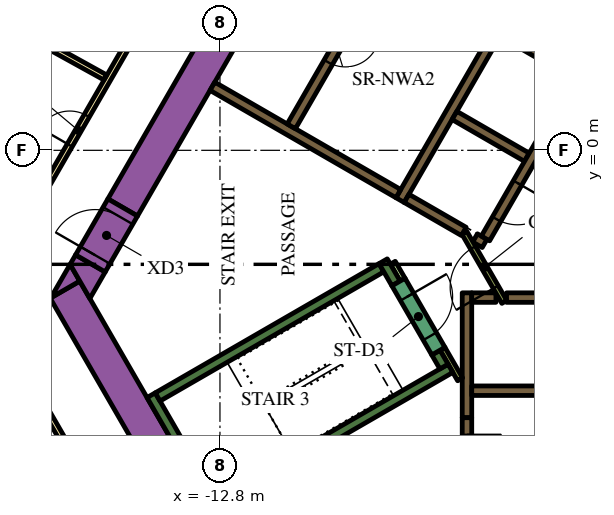
"""IFC4 building model, lengths in metres.
Left out: names, types, materials, properties, quantities, classifications, styles, units other than length and angle.
Written with IfcOpenShell. Run it as: python <this file> out.ifc"""

import sys

from ifc_helpers import new_model, si_unit, direction, frame, frame_2d, origin, place, context, subcontext, project, spatial, polyline, rectangle, outline, extrude, element, fill, save


model = new_model("IFC4")
c1 = context("Model", 3, precision=1e-05, world=origin(), true_north=direction((0.0, 1.0)))
c2 = subcontext(c1, "Body", "Model", "MODEL_VIEW")
j1 = project(units=[si_unit("LENGTHUNIT", "METRE"), si_unit("PLANEANGLEUNIT", "RADIAN")], contexts=[c1])
p1 = place(None, origin())
s1 = spatial("IfcSite", under=j1, at=p1, CompositionType="ELEMENT")
p2 = place(p1, origin())
s2 = spatial("IfcBuilding", under=s1, at=p2, CompositionType="ELEMENT")
p3 = place(p2, frame((0.0, 0.0, 70.5)))
s3 = spatial("IfcBuildingStorey", under=s2, at=p3, CompositionType="ELEMENT", Elevation=70.5)
p4 = place(p3, frame((-15.36, -1.503, 0.0), z_axis=(0.0, 0.0, 1.0), x_axis=(0.50000389221, 0.866023156604, 0.0)))
e1 = element("IfcWall", 1, at=p4, inside=s3, PredefinedType="SOLIDWALL", context=c2, shape_type="SweptSolid", body=[
    extrude(rectangle(XDim=21.0, YDim=0.9, at=frame_2d((10.5, 0.0))), origin(), (0.0, 0.0, 1.0), 3.9),
])
p5 = place(p3, frame((-12.134, -11.883, 0.0), z_axis=(0.0, 0.0, 1.0), x_axis=(-0.500005339912, 0.866022320763, 0.0)))
e2 = element("IfcWall", 2, at=p5, inside=s3, PredefinedType="SOLIDWALL", context=c2, shape_type="SweptSolid", body=[
    extrude(rectangle(XDim=9.488, YDim=0.9, at=frame_2d((4.744, 0.0))), origin(), (0.0, 0.0, 1.0), 3.9),
])
p6 = place(p3, origin())
e3 = element("IfcWall", 3, at=p6, inside=s3, PredefinedType="SOLIDWALL", context=c2, shape_type="SweptSolid", body=[
    extrude(outline(polyline([(-16.489, -3.44), (-17.251, -3.88), (-16.743, -3.0), (-16.489, -3.44)])), origin(), (0.0, 0.0, 1.0), 3.9),
])
e4 = element("IfcWall", 4, at=p6, inside=s3, PredefinedType="SOLIDWALL", context=c2, shape_type="SweptSolid", body=[
    extrude(outline(polyline([(-15.82, -3.201), (-16.223, -3.9), (-16.743, -3.0), (-16.599, -2.751), (-15.82, -3.201)])), origin(), (0.0, 0.0, 1.0), 3.9),
])
p7 = place(p3, frame((-12.885, -9.431, 0.0), z_axis=(0.0, 0.0, 1.0), x_axis=(-0.500020560727, 0.866013532718, 0.0)))
e5 = element("IfcWall", 5, at=p7, inside=s3, PredefinedType="SOLIDWALL", context=c2, shape_type="SweptSolid", body=[
    extrude(rectangle(XDim=3.45, YDim=0.25, at=frame_2d((1.725, 0.0))), origin(), (0.0, 0.0, 1.0), 3.9),
])
p8 = place(p3, frame((-14.44, -6.49, 0.0), z_axis=(0.0, 0.0, 1.0), x_axis=(0.866022966069, 0.500004222222, 0.0)))
e6 = element("IfcWall", 6, at=p8, inside=s3, PredefinedType="SOLIDWALL", context=c2, shape_type="SweptSolid", body=[
    extrude(rectangle(XDim=6.8, YDim=0.25, at=frame_2d((3.4, 0.0))), origin(), (0.0, 0.0, 1.0), 3.9),
])
p9 = place(p3, frame((-8.168, -3.503, 0.0), z_axis=(0.0, 0.0, 1.0), x_axis=(-0.499952099219, 0.866053057547, 0.0)))
e7 = element("IfcWall", 7, at=p9, inside=s3, PredefinedType="SOLIDWALL", context=c2, shape_type="SweptSolid", body=[
    extrude(rectangle(XDim=0.675, YDim=0.25, at=frame_2d((0.337, 0.0))), origin(), (0.0, 0.0, 1.0), 3.9),
])
p10 = place(p3, frame((-12.84, -9.261, 0.0), z_axis=(0.0, 0.0, 1.0), x_axis=(0.866016039709, 0.500016218704, 0.0)))
e8 = element("IfcWall", 8, at=p10, inside=s3, PredefinedType="SOLIDWALL", context=c2, shape_type="SweptSolid", body=[
    extrude(rectangle(XDim=7.05, YDim=0.25, at=frame_2d((3.525, 0.0))), origin(), (0.0, 0.0, 1.0), 3.9),
])
p11 = place(p3, frame((-6.905, -5.69, 0.0), z_axis=(0.0, 0.0, 1.0), x_axis=(-0.500402024738, 0.865793170242, 0.0)))
e9 = element("IfcWall", 9, at=p11, inside=s3, PredefinedType="SOLIDWALL", context=c2, shape_type="SweptSolid", body=[
    extrude(rectangle(XDim=0.425, YDim=0.25, at=frame_2d((0.212, 0.0))), origin(), (0.0, 0.0, 1.0), 3.9),
])
p12 = place(p3, frame((-5.259, -3.875, 0.0), z_axis=(0.0, 0.0, 1.0), x_axis=(1.0, 0.0, 0.0)))
e10 = element("IfcWall", 10, at=p12, inside=s3, PredefinedType="SOLIDWALL", context=c2, shape_type="SweptSolid", body=[
    extrude(rectangle(XDim=10.489, YDim=0.25, at=frame_2d((5.244, 0.0))), origin(), (0.0, 0.0, 1.0), 3.9),
])
p13 = place(p3, frame((-6.3, -7.035, 0.0), z_axis=(0.0, 0.0, 1.0), x_axis=(0.0, 1.0, 0.0)))
e11 = element("IfcWall", 11, at=p13, inside=s3, PredefinedType="SOLIDWALL", context=c2, shape_type="SweptSolid", body=[
    extrude(rectangle(XDim=3.285, YDim=0.25, at=frame_2d((1.643, 0.0))), origin(), (0.0, 0.0, 1.0), 3.9),
])
p14 = place(p3, frame((-6.175, -3.875, 0.0), z_axis=(0.0, 0.0, 1.0), x_axis=(1.0, 0.0, 0.0)))
e12 = element("IfcWall", 12, at=p14, inside=s3, PredefinedType="SOLIDWALL", context=c2, shape_type="SweptSolid", body=[
    extrude(rectangle(XDim=0.637, YDim=0.25, at=frame_2d((0.318, 0.0))), origin(), (0.0, 0.0, 1.0), 3.9),
])
p15 = place(p3, frame((-8.06, -1.311, 0.0), z_axis=(0.0, 0.0, 1.0), x_axis=(0.50000273126, 0.866023826885, 0.0)))
e13 = element("IfcWall", 13, at=p15, inside=s3, PredefinedType="SOLIDWALL", context=c2, shape_type="SweptSolid", body=[
    extrude(rectangle(XDim=10.33, YDim=0.25, at=frame_2d((5.165, 0.0))), origin(), (0.0, 0.0, 1.0), 3.9),
])
for number, where, z_axis, x_axis in (
    (14, (-5.369, 3.1, 0.0), (0.0, 0.0, 1.0), (0.866, -0.5, 0.0)),
    (15, (-4.724, -0.182, 0.0), (0.0, 0.0, 1.0), (-0.866, 0.5, 0.0)),
):
    element("IfcWall", number, at=place(p3, frame(where, z_axis=z_axis, x_axis=x_axis)), inside=s3, PredefinedType="SOLIDWALL", context=c2, shape_type="SweptSolid", body=[
        extrude(rectangle(XDim=2.2, YDim=0.25, at=frame_2d((1.1, 0.0))), origin(), (0.0, 0.0, 1.0), 3.9),
    ])
p16 = place(p3, frame((-6.088, -2.305, 0.0), z_axis=(0.0, 0.0, 1.0), x_axis=(0.866059450854, -0.499941024108, 0.0)))
e16 = element("IfcWall", 16, at=p16, inside=s3, PredefinedType="SOLIDWALL", context=c2, shape_type="SweptSolid", body=[
    extrude(rectangle(XDim=0.29, YDim=0.25, at=frame_2d((0.145, 0.0))), origin(), (0.0, 0.0, 1.0), 3.9),
])
p17 = place(p3, frame((-7.889, -1.265, 0.0), z_axis=(0.0, 0.0, 1.0), x_axis=(0.865986741702, -0.500066958712, 0.0)))
e17 = element("IfcWall", 17, at=p17, inside=s3, PredefinedType="SOLIDWALL", context=c2, shape_type="SweptSolid", body=[
    extrude(rectangle(XDim=1.738, YDim=0.25, at=frame_2d((0.869, 0.0))), origin(), (0.0, 0.0, 1.0), 3.9),
])
p18 = place(p3, frame((-8.106, -1.14, 0.0), z_axis=(0.0, 0.0, 1.0), x_axis=(-0.866000643155, 0.500042884217, 0.0)))
e18 = element("IfcWall", 18, at=p18, inside=s3, PredefinedType="SOLIDWALL", context=c2, shape_type="SweptSolid", body=[
    extrude(rectangle(XDim=5.65, YDim=0.25, at=frame_2d((2.825, 0.0))), origin(), (0.0, 0.0, 1.0), 3.9),
])
p19 = place(p3, frame((-6.48, -6.027, 0.0), z_axis=(0.0, 0.0, 1.0), x_axis=(-0.499927229454, 0.866067413802, 0.0)))
e19 = element("IfcWall", 19, at=p19, inside=s3, PredefinedType="PARTITIONING", context=c2, shape_type="SweptSolid", body=[
    extrude(rectangle(XDim=0.929, YDim=0.15, at=frame_2d((0.464, 0.0))), origin(), (0.0, 0.0, 1.0), 3.9),
])
p20 = place(p3, frame((-8.252, -2.958, 0.0), z_axis=(0.0, 0.0, 1.0), x_axis=(0.500174715838, -0.865924508047, 0.0)))
e20 = element("IfcWall", 20, at=p20, inside=s3, PredefinedType="PARTITIONING", context=c2, shape_type="SweptSolid", body=[
    extrude(rectangle(XDim=0.514, YDim=0.15, at=frame_2d((0.257, 0.0))), origin(), (0.0, 0.0, 1.0), 2.75),
])
p21 = place(p3, frame((-6.175, -6.325, 0.0), z_axis=(0.0, 0.0, 1.0), x_axis=(1.0, 0.0, 0.0)))
e21 = element("IfcWall", 21, at=p21, inside=s3, PredefinedType="SOLIDWALL", context=c2, shape_type="SweptSolid", body=[
    extrude(rectangle(XDim=12.35, YDim=0.25, at=frame_2d((6.175, 0.0))), origin(), (0.0, 0.0, 1.0), 3.9),
])
p22 = place(p21, frame((3.205, 0.0, 0.0)))
e22 = element("IfcOpeningElement", 22, at=p22, cuts=e21, PredefinedType="OPENING", context=c2, shape_type="SweptSolid", body=[
    extrude(rectangle(XDim=0.9, YDim=2.1, at=frame_2d((0.45, 1.05))), frame((0.0, 0.135, 0.0), z_axis=(0.0, -1.0, 0.0), x_axis=(1.0, 0.0, 0.0)), (0.0, 0.0, 1.0), 0.27),
])
p23 = place(p21, frame((8.145, 0.0, 0.0)))
e23 = element("IfcOpeningElement", 23, at=p23, cuts=e21, PredefinedType="OPENING", context=c2, shape_type="SweptSolid", body=[
    extrude(rectangle(XDim=1.1, YDim=2.1, at=frame_2d((0.55, 1.05))), frame((0.0, 0.135, 0.0), z_axis=(0.0, -1.0, 0.0), x_axis=(1.0, 0.0, 0.0)), (0.0, 0.0, 1.0), 0.27),
])
p24 = place(p21, frame((10.665, 0.0, 0.0)))
e24 = element("IfcOpeningElement", 24, at=p24, cuts=e21, PredefinedType="OPENING", context=c2, shape_type="SweptSolid", body=[
    extrude(rectangle(XDim=1.1, YDim=2.1, at=frame_2d((0.55, 1.05))), frame((0.0, 0.135, 0.0), z_axis=(0.0, -1.0, 0.0), x_axis=(1.0, 0.0, 0.0)), (0.0, 0.0, 1.0), 0.27),
])
p25 = place(p3, frame((-6.008, 9.144, 0.0), z_axis=(0.0, 0.0, 1.0), x_axis=(-0.500006956611, -0.866021387346, 0.0)))
e25 = element("IfcWall", 25, at=p25, inside=s3, PredefinedType="SOLIDWALL", context=c2, shape_type="SweptSolid", body=[
    extrude(rectangle(XDim=9.83, YDim=0.25, at=frame_2d((4.915, 0.0))), origin(), (0.0, 0.0, 1.0), 3.9),
])
p26 = place(p25, frame((6.985, 0.0, 0.0)))
e26 = element("IfcOpeningElement", 26, at=p26, cuts=e25, PredefinedType="OPENING", context=c2, shape_type="SweptSolid", body=[
    extrude(rectangle(XDim=0.9, YDim=2.1, at=frame_2d((0.45, 1.05))), frame((0.0, 0.135, 0.0), z_axis=(0.0, -1.0, 0.0), x_axis=(1.0, 0.0, 0.0)), (0.0, 0.0, 1.0), 0.27),
])
p27 = place(p3, frame((-0.898, 6.194, 0.0), z_axis=(0.0, 0.0, 1.0), x_axis=(-0.499996202215, -0.866027596426, 0.0)))
e27 = element("IfcWall", 27, at=p27, inside=s3, PredefinedType="SOLIDWALL", context=c2, shape_type="SweptSolid", body=[
    extrude(rectangle(XDim=9.83, YDim=0.25, at=frame_2d((4.915, 0.0))), origin(), (0.0, 0.0, 1.0), 3.9),
])
p28 = place(p27, frame((0.585, 0.0, 0.0)))
e28 = element("IfcOpeningElement", 28, at=p28, cuts=e27, PredefinedType="OPENING", context=c2, shape_type="SweptSolid", body=[
    extrude(rectangle(XDim=1.1, YDim=2.1, at=frame_2d((0.55, 1.05))), frame((0.0, 0.135, 0.0), z_axis=(0.0, -1.0, 0.0), x_axis=(1.0, 0.0, 0.0)), (0.0, 0.0, 1.0), 0.27),
])
p29 = place(p27, frame((3.105, 0.0, 0.0)))
e29 = element("IfcOpeningElement", 29, at=p29, cuts=e27, PredefinedType="OPENING", context=c2, shape_type="SweptSolid", body=[
    extrude(rectangle(XDim=1.1, YDim=2.1, at=frame_2d((0.55, 1.05))), frame((0.0, 0.135, 0.0), z_axis=(0.0, -1.0, 0.0), x_axis=(1.0, 0.0, 0.0)), (0.0, 0.0, 1.0), 0.27),
])
p30 = place(p27, frame((5.625, 0.0, 0.0)))
e30 = element("IfcOpeningElement", 30, at=p30, cuts=e27, PredefinedType="OPENING", context=c2, shape_type="SweptSolid", body=[
    extrude(rectangle(XDim=1.1, YDim=2.1, at=frame_2d((0.55, 1.05))), frame((0.0, 0.135, 0.0), z_axis=(0.0, -1.0, 0.0), x_axis=(1.0, 0.0, 0.0)), (0.0, 0.0, 1.0), 0.27),
])
p31 = place(p27, frame((8.145, 0.0, 0.0)))
e31 = element("IfcOpeningElement", 31, at=p31, cuts=e27, PredefinedType="OPENING", context=c2, shape_type="SweptSolid", body=[
    extrude(rectangle(XDim=1.1, YDim=2.1, at=frame_2d((0.55, 1.05))), frame((0.0, 0.135, 0.0), z_axis=(0.0, -1.0, 0.0), x_axis=(1.0, 0.0, 0.0)), (0.0, 0.0, 1.0), 0.27),
])
p32 = place(p3, frame((-8.103, -3.466, 0.0), z_axis=(0.0, 0.0, 1.0), x_axis=(0.500078061341, -0.865980330357, 0.0)))
e32 = element("IfcWall", 32, at=p32, inside=s3, PredefinedType="SOLIDWALL", context=c2, shape_type="SweptSolid", body=[
    extrude(rectangle(XDim=2.1, YDim=0.4, at=frame_2d((1.05, 0.0))), origin(), (0.0, 0.0, 1.0), 3.9),
])
p33 = place(p32, frame((0.45, 0.0, 0.0)))
e33 = element("IfcOpeningElement", 33, at=p33, cuts=e32, PredefinedType="OPENING", context=c2, shape_type="SweptSolid", body=[
    extrude(rectangle(XDim=1.2, YDim=2.1, at=frame_2d((0.6, 1.05))), frame((0.0, 0.21, 0.0), z_axis=(0.0, -1.0, 0.0), x_axis=(1.0, 0.0, 0.0)), (0.0, 0.0, 1.0), 0.42),
])
p34 = place(p3, frame((-6.3, -7.035, 0.0), z_axis=(0.0, 0.0, 1.0), x_axis=(0.0, -1.0, 0.0)))
e34 = element("IfcWall", 34, at=p34, inside=s3, PredefinedType="SOLIDWALL", context=c2, shape_type="SweptSolid", body=[
    extrude(rectangle(XDim=1.8, YDim=0.25, at=frame_2d((0.9, 0.0))), origin(), (0.0, 0.0, 1.0), 3.9),
])
p35 = place(p34, frame((0.45, 0.0, 0.0)))
e35 = element("IfcOpeningElement", 35, at=p35, cuts=e34, PredefinedType="OPENING", context=c2, shape_type="SweptSolid", body=[
    extrude(rectangle(XDim=0.9, YDim=2.1, at=frame_2d((0.45, 1.05))), frame((0.0, 0.135, 0.0), z_axis=(0.0, -1.0, 0.0), x_axis=(1.0, 0.0, 0.0)), (0.0, 0.0, 1.0), 0.27),
])
p36 = place(p3, frame((-5.317, -3.99, 0.0), z_axis=(0.0, 0.0, 1.0), x_axis=(-0.500027713859, 0.866009402589, 0.0)))
e36 = element("IfcWall", 36, at=p36, inside=s3, PredefinedType="PARTITIONING", context=c2, shape_type="SweptSolid", body=[
    extrude(rectangle(XDim=2.1, YDim=0.15, at=frame_2d((1.05, 0.0))), origin(), (0.0, 0.0, 1.0), 3.9),
])
p37 = place(p36, frame((0.45, 0.0, 0.0)))
e37 = element("IfcOpeningElement", 37, at=p37, cuts=e36, PredefinedType="OPENING", context=c2, shape_type="SweptSolid", body=[
    extrude(rectangle(XDim=1.2, YDim=2.1, at=frame_2d((0.6, 1.05))), frame((0.0, 0.085, 0.0), z_axis=(0.0, -1.0, 0.0), x_axis=(1.0, 0.0, 0.0)), (0.0, 0.0, 1.0), 0.17),
])
p38 = place(p3, frame((-16.209, -2.976, 0.0), z_axis=(0.0, 0.0, 1.0), x_axis=(0.499954529098, 0.86605165483, 0.0)))
e38 = element("IfcWall", 38, at=p38, inside=s3, PredefinedType="SOLIDWALL", context=c2, shape_type="SweptSolid", body=[
    extrude(rectangle(XDim=1.7, YDim=0.9, at=frame_2d((0.85, 0.0))), origin(), (0.0, 0.0, 1.0), 3.9),
])
p39 = place(p38, frame((0.25, 0.0, 0.0)))
e39 = element("IfcOpeningElement", 39, at=p39, cuts=e38, PredefinedType="OPENING", context=c2, shape_type="SweptSolid", body=[
    extrude(rectangle(XDim=1.2, YDim=2.1, at=frame_2d((0.6, 1.05))), frame((0.0, 0.46, 0.0), z_axis=(0.0, -1.0, 0.0), x_axis=(1.0, 0.0, 0.0)), (0.0, 0.0, 1.0), 0.92),
])
p40 = place(p3, frame((-19.081, -3.9, 0.0), z_axis=(0.0, 0.0, 1.0), x_axis=(0.499998313975, 0.866026377209, 0.0)))
e40 = element("IfcWall", 40, at=p40, inside=s3, PredefinedType="PARTITIONING", context=c2, shape_type="SweptSolid", body=[
    extrude(rectangle(XDim=25.766, YDim=0.15, at=frame_2d((12.883, 0.0))), origin(), (0.0, 0.0, 1.0), 2.75),
])
p41 = place(p40, frame((24.586, 0.0, 0.0)))
e41 = element("IfcOpeningElement", 41, at=p41, cuts=e40, PredefinedType="OPENING", context=c2, shape_type="SweptSolid", body=[
    extrude(rectangle(XDim=1.0, YDim=2.1, at=frame_2d((0.5, 1.05))), frame((0.0, 0.085, 0.0), z_axis=(0.0, -1.0, 0.0), x_axis=(1.0, 0.0, 0.0)), (0.0, 0.0, 1.0), 0.17),
])
p42 = place(p40, frame((9.948, 0.0, 0.0)))
e42 = element("IfcOpeningElement", 42, at=p42, cuts=e40, PredefinedType="OPENING", context=c2, shape_type="SweptSolid", body=[
    extrude(rectangle(XDim=1.0, YDim=2.1, at=frame_2d((0.5, 1.05))), frame((0.0, 0.085, 0.0), z_axis=(0.0, -1.0, 0.0), x_axis=(1.0, 0.0, 0.0)), (0.0, 0.0, 1.0), 0.17),
])
p43 = place(p40, frame((7.782, 0.0, 0.0)))
e43 = element("IfcOpeningElement", 43, at=p43, cuts=e40, PredefinedType="OPENING", context=c2, shape_type="SweptSolid", body=[
    extrude(rectangle(XDim=0.9, YDim=2.1, at=frame_2d((0.45, 1.05))), frame((0.0, 0.085, 0.0), z_axis=(0.0, -1.0, 0.0), x_axis=(1.0, 0.0, 0.0)), (0.0, 0.0, 1.0), 0.17),
])
p44 = place(p40, frame((4.658, 0.0, 0.0)))
e44 = element("IfcOpeningElement", 44, at=p44, cuts=e40, PredefinedType="OPENING", context=c2, shape_type="SweptSolid", body=[
    extrude(rectangle(XDim=0.9, YDim=2.1, at=frame_2d((0.45, 1.05))), frame((0.0, 0.085, 0.0), z_axis=(0.0, -1.0, 0.0), x_axis=(1.0, 0.0, 0.0)), (0.0, 0.0, 1.0), 0.17),
])
p45 = place(p3, frame((-16.412, -8.523, 0.0), z_axis=(0.0, 0.0, 1.0), x_axis=(-0.500001929737, 0.866024289647, 0.0)))
e45 = element("IfcWall", 45, at=p45, inside=s3, PredefinedType="PARTITIONING", context=c2, shape_type="SweptSolid", body=[
    extrude(rectangle(XDim=5.268, YDim=0.15, at=frame_2d((2.634, 0.0))), origin(), (0.0, 0.0, 1.0), 2.75),
])
p46 = place(p45, frame((4.088, 0.0, 0.0)))
e46 = element("IfcOpeningElement", 46, at=p46, cuts=e45, PredefinedType="OPENING", context=c2, shape_type="SweptSolid", body=[
    extrude(rectangle(XDim=1.0, YDim=2.1, at=frame_2d((0.5, 1.05))), frame((0.0, 0.085, 0.0), z_axis=(0.0, -1.0, 0.0), x_axis=(1.0, 0.0, 0.0)), (0.0, 0.0, 1.0), 0.17),
])
p47 = place(p3, frame((-23.132, 5.962, 0.0), z_axis=(0.0, 0.0, 1.0), x_axis=(0.875121716713, -0.483902863121, 0.0)))
e47 = element("IfcWall", 47, at=p47, inside=s3, PredefinedType="PARTITIONING", context=c2, shape_type="SweptSolid", body=[
    extrude(rectangle(XDim=8.355, YDim=0.15, at=frame_2d((4.178, 0.0))), origin(), (0.0, 0.0, 1.0), 2.75),
])
p48 = place(p26, origin())
e48 = element("IfcDoor", 48, at=p48, inside=s3, OperationType="SINGLE_SWING_LEFT", PredefinedType="DOOR", context=c2, shape_type="SweptSolid", body=[
    extrude(rectangle(XDim=0.9, YDim=2.1, at=frame_2d((0.45, 1.05))), frame((0.0, 0.025, 0.0), z_axis=(0.0, -1.0, 0.0), x_axis=(1.0, 0.0, 0.0)), (0.0, 0.0, 1.0), 0.05),
])
fill(e26, e48)
p49 = place(p31, origin())
e49 = element("IfcDoor", 49, at=p49, inside=s3, OperationType="DOUBLE_DOOR_SLIDING", PredefinedType="DOOR", context=c2, shape_type="SweptSolid", body=[
    extrude(rectangle(XDim=1.1, YDim=2.1, at=frame_2d((0.55, 1.05))), frame((0.0, 0.025, 0.0), z_axis=(0.0, -1.0, 0.0), x_axis=(1.0, 0.0, 0.0)), (0.0, 0.0, 1.0), 0.05),
])
fill(e31, e49)
p50 = place(p33, origin())
e50 = element("IfcDoor", 50, at=p50, inside=s3, OperationType="SINGLE_SWING_LEFT", PredefinedType="DOOR", context=c2, shape_type="SweptSolid", body=[
    extrude(rectangle(XDim=1.2, YDim=2.1, at=frame_2d((0.6, 1.05))), frame((0.0, 0.025, 0.0), z_axis=(0.0, -1.0, 0.0), x_axis=(1.0, 0.0, 0.0)), (0.0, 0.0, 1.0), 0.05),
])
fill(e33, e50)
p51 = place(p35, origin())
e51 = element("IfcDoor", 51, at=p51, inside=s3, OperationType="SINGLE_SWING_LEFT", PredefinedType="DOOR", context=c2, shape_type="SweptSolid", body=[
    extrude(rectangle(XDim=0.9, YDim=2.1, at=frame_2d((0.45, 1.05))), frame((0.0, 0.025, 0.0), z_axis=(0.0, -1.0, 0.0), x_axis=(1.0, 0.0, 0.0)), (0.0, 0.0, 1.0), 0.05),
])
fill(e35, e51)
p52 = place(p37, origin())
e52 = element("IfcDoor", 52, at=p52, inside=s3, OperationType="SINGLE_SWING_LEFT", PredefinedType="DOOR", context=c2, shape_type="SweptSolid", body=[
    extrude(rectangle(XDim=1.2, YDim=2.1, at=frame_2d((0.6, 1.05))), frame((0.0, 0.025, 0.0), z_axis=(0.0, -1.0, 0.0), x_axis=(1.0, 0.0, 0.0)), (0.0, 0.0, 1.0), 0.05),
])
fill(e37, e52)
p53 = place(p39, origin())
e53 = element("IfcDoor", 53, at=p53, inside=s3, OperationType="SINGLE_SWING_LEFT", PredefinedType="DOOR", context=c2, shape_type="SweptSolid", body=[
    extrude(rectangle(XDim=1.2, YDim=2.1, at=frame_2d((0.6, 1.05))), frame((0.0, 0.025, 0.0), z_axis=(0.0, -1.0, 0.0), x_axis=(1.0, 0.0, 0.0)), (0.0, 0.0, 1.0), 0.05),
])
fill(e39, e53)
p54 = place(p44, origin())
e54 = element("IfcDoor", 54, at=p54, inside=s3, OperationType="SINGLE_SWING_LEFT", PredefinedType="DOOR", context=c2, shape_type="SweptSolid", body=[
    extrude(rectangle(XDim=0.9, YDim=2.1, at=frame_2d((0.45, 1.05))), frame((0.0, 0.025, 0.0), z_axis=(0.0, -1.0, 0.0), x_axis=(1.0, 0.0, 0.0)), (0.0, 0.0, 1.0), 0.05),
])
fill(e44, e54)
save(model, sys.argv[1])
